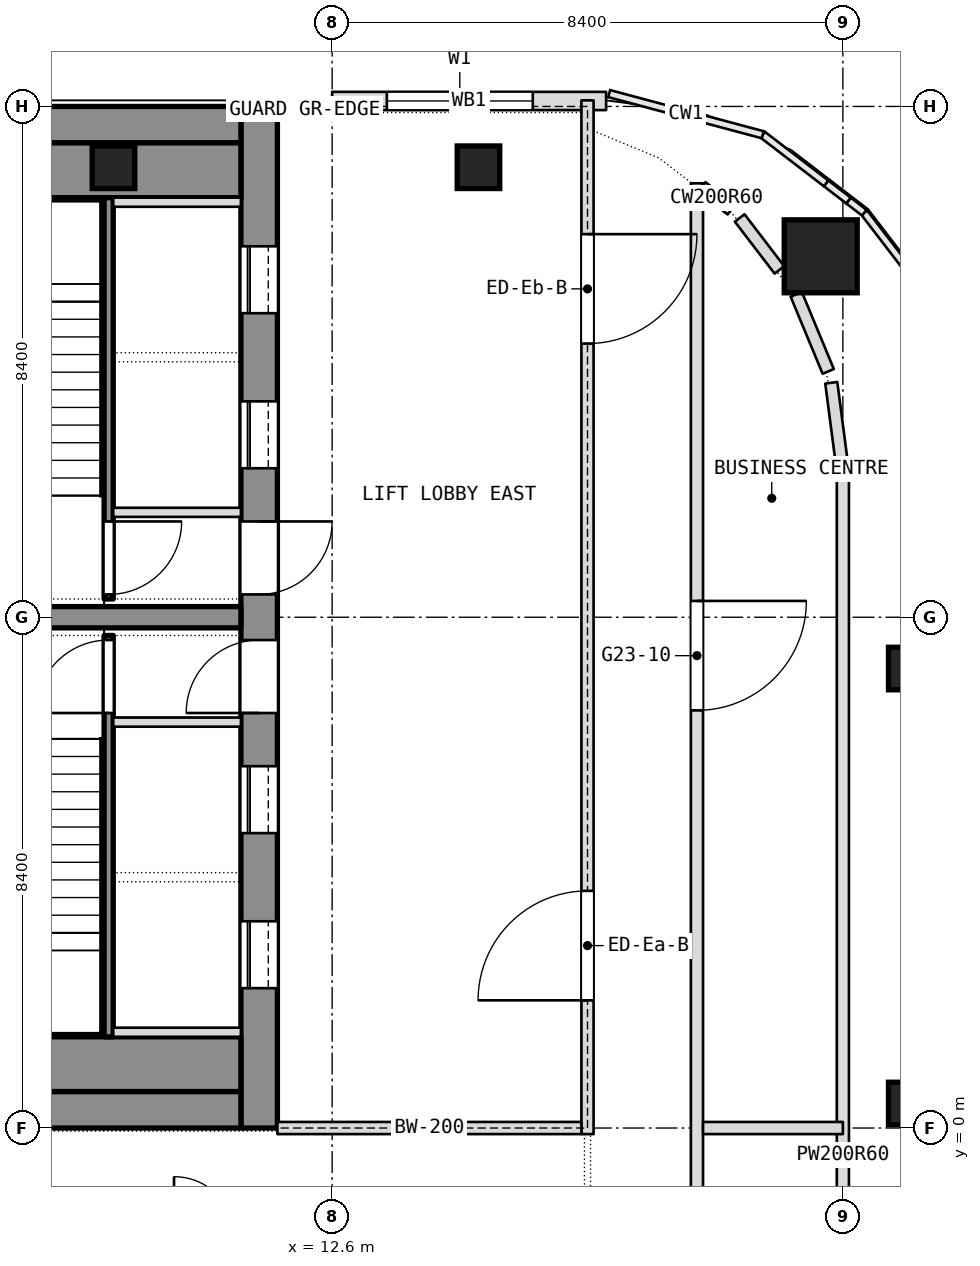
"""IFC4 building model, lengths in metres.
Left out: names, types, materials, properties, quantities, classifications, styles, units other than length and angle.
Written with IfcOpenShell. Run it as: python <this file> out.ifc"""

import sys

from ifc_helpers import new_model, si_unit, direction, frame, frame_2d, origin, origin_2d, place, context, subcontext, project, spatial, rectangle, extrude, element, fill, save


model = new_model("IFC4")
c1 = context("Model", 3, precision=1e-05, world=origin(), true_north=direction((0.0, 1.0)))
c2 = subcontext(c1, "Body", "Model", "MODEL_VIEW")
j1 = project(units=[si_unit("LENGTHUNIT", "METRE"), si_unit("PLANEANGLEUNIT", "RADIAN")], contexts=[c1])
p1 = place(None, origin())
s1 = spatial("IfcSite", under=j1, at=p1, CompositionType="ELEMENT")
p2 = place(p1, origin())
s2 = spatial("IfcBuilding", under=s1, at=p2, CompositionType="ELEMENT")
p3 = place(p2, frame((0.0, 0.0, 270.5)))
s3 = spatial("IfcBuildingStorey", under=s2, at=p3, CompositionType="ELEMENT", Elevation=270.5)
p4 = place(p3, frame((11.4, 0.0, 0.0), z_axis=(0.0, 0.0, 1.0), x_axis=(0.0, 1.0, 0.0)))
e1 = element("IfcWall", 1, at=p4, inside=s3, PredefinedType="SHEAR", context=c2, shape_type="SweptSolid", body=[
    extrude(rectangle(XDim=16.8, YDim=0.6, at=frame_2d((8.4, 0.0))), origin(), (0.0, 0.0, 1.0), 3.6),
])
p5 = place(p4, frame((2.3, 0.0, 0.0)))
e2 = element("IfcOpeningElement", 2, at=p5, cuts=e1, PredefinedType="OPENING", context=c2, shape_type="SweptSolid", body=[
    extrude(rectangle(XDim=1.1, YDim=2.1, at=frame_2d((0.55, 1.05))), frame((0.0, 0.3, 0.0), z_axis=(0.0, -1.0, 0.0), x_axis=(1.0, 0.0, 0.0)), (0.0, 0.0, 1.0), 0.6),
])
p6 = place(p4, frame((4.85, 0.0, 0.0)))
e3 = element("IfcOpeningElement", 3, at=p6, cuts=e1, PredefinedType="OPENING", context=c2, shape_type="SweptSolid", body=[
    extrude(rectangle(XDim=1.1, YDim=2.1, at=frame_2d((0.55, 1.05))), frame((0.0, 0.3, 0.0), z_axis=(0.0, -1.0, 0.0), x_axis=(1.0, 0.0, 0.0)), (0.0, 0.0, 1.0), 0.6),
])
p7 = place(p4, frame((6.825, 0.0, 0.0)))
e4 = element("IfcOpeningElement", 4, at=p7, cuts=e1, PredefinedType="OPENING", context=c2, shape_type="SweptSolid", body=[
    extrude(rectangle(XDim=1.2, YDim=2.1, at=frame_2d((0.6, 1.05))), frame((0.0, 0.3, 0.0), z_axis=(0.0, -1.0, 0.0), x_axis=(1.0, 0.0, 0.0)), (0.0, 0.0, 1.0), 0.6),
])
p8 = place(p4, frame((13.4, 0.0, 0.0)))
e5 = element("IfcOpeningElement", 5, at=p8, cuts=e1, PredefinedType="OPENING", context=c2, shape_type="SweptSolid", body=[
    extrude(rectangle(XDim=1.1, YDim=2.1, at=frame_2d((0.55, 1.05))), frame((0.0, 0.3, 0.0), z_axis=(0.0, -1.0, 0.0), x_axis=(1.0, 0.0, 0.0)), (0.0, 0.0, 1.0), 0.6),
])
p9 = place(p4, frame((10.85, 0.0, 0.0)))
e6 = element("IfcOpeningElement", 6, at=p9, cuts=e1, PredefinedType="OPENING", context=c2, shape_type="SweptSolid", body=[
    extrude(rectangle(XDim=1.1, YDim=2.1, at=frame_2d((0.55, 1.05))), frame((0.0, 0.3, 0.0), z_axis=(0.0, -1.0, 0.0), x_axis=(1.0, 0.0, 0.0)), (0.0, 0.0, 1.0), 0.6),
])
p10 = place(p4, frame((8.775, 0.0, 0.0)))
e7 = element("IfcOpeningElement", 7, at=p10, cuts=e1, PredefinedType="OPENING", context=c2, shape_type="SweptSolid", body=[
    extrude(rectangle(XDim=1.2, YDim=2.1, at=frame_2d((0.6, 1.05))), frame((0.0, 0.3, 0.0), z_axis=(0.0, -1.0, 0.0), x_axis=(1.0, 0.0, 0.0)), (0.0, 0.0, 1.0), 0.6),
])
for number, where, z_axis, x_axis in (
    (8, (-11.1, 0.3, 0.0), (0.0, 0.0, 1.0), (1.0, 0.0, 0.0)),
    (9, (-11.1, 16.5, 0.0), (0.0, 0.0, 1.0), (1.0, 0.0, 0.0)),
):
    element("IfcWall", number, at=place(p3, frame(where, z_axis=z_axis, x_axis=x_axis)), inside=s3, PredefinedType="SHEAR", context=c2, shape_type="SweptSolid", body=[
        extrude(rectangle(XDim=22.2, YDim=0.6, at=frame_2d((11.1, 0.0))), origin(), (0.0, 0.0, 1.0), 3.6),
    ])
p11 = place(p3, frame((4.375, 8.4, 0.0), z_axis=(0.0, 0.0, 1.0), x_axis=(1.0, 0.0, 0.0)))
e10 = element("IfcWall", 10, at=p11, inside=s3, PredefinedType="SHEAR", context=c2, shape_type="SweptSolid", body=[
    extrude(rectangle(XDim=6.725, YDim=0.35, at=frame_2d((3.363, 0.0))), origin(), (0.0, 0.0, 1.0), 3.6),
])
p12 = place(p3, frame((20.635, 14.335, 0.0), z_axis=(0.0, 0.0, 1.0), x_axis=(1.0, 0.0, 0.0)))
e11 = element("IfcColumn", 11, at=p12, inside=s3, PredefinedType="COLUMN", context=c2, shape_type="SweptSolid", body=[
    extrude(rectangle(XDim=1.2, YDim=1.2, at=origin_2d()), origin(), (0.0, 0.0, 1.0), 3.6),
])
for number, where, z_axis, x_axis in (
    (12, (9.004, 15.8, 0.0), (0.0, 0.0, 1.0), (1.0, 0.0, 0.0)),
    (13, (15.007, 15.8, 0.0), (0.0, 0.0, 1.0), (1.0, 0.0, 0.0)),
    (14, (22.1, 7.556, 0.0), (0.0, 0.0, 1.0), (1.0, 0.0, 0.0)),
    (15, (22.1, 0.403, 0.0), (0.0, 0.0, 1.0), (1.0, 0.0, 0.0)),
):
    element("IfcColumn", number, at=place(p3, frame(where, z_axis=z_axis, x_axis=x_axis)), inside=s3, PredefinedType="COLUMN", context=c2, shape_type="SweptSolid", body=[
        extrude(rectangle(XDim=0.7, YDim=0.7, at=origin_2d()), origin(), (0.0, 0.0, 1.0), 3.6),
    ])
p13 = place(p3, frame((21.0, -11.6, 0.0), z_axis=(0.0, 0.0, 1.0), x_axis=(0.0, 1.0, 0.0)))
e16 = element("IfcWall", 16, at=p13, inside=s3, PredefinedType="PARTITIONING", context=c2, shape_type="SweptSolid", body=[
    extrude(rectangle(XDim=22.302, YDim=0.2, at=frame_2d((11.151, 0.0))), origin(), (0.0, 0.0, 1.0), 3.34),
])
p14 = place(p3, frame((18.6, -11.8, 0.0), z_axis=(0.0, 0.0, 1.0), x_axis=(0.0, 1.0, 0.0)))
e17 = element("IfcWall", 17, at=p14, inside=s3, PredefinedType="PARTITIONING", context=c2, shape_type="SweptSolid", body=[
    extrude(rectangle(XDim=27.336, YDim=0.2, at=frame_2d((13.668, 0.0))), origin(), (0.0, 0.0, 1.0), 3.34),
])
p15 = place(p14, frame((18.668, 0.0, 0.0)))
e18 = element("IfcOpeningElement", 18, at=p15, cuts=e17, PredefinedType="OPENING", context=c2, shape_type="SweptSolid", body=[
    extrude(rectangle(XDim=1.8, YDim=2.1, at=frame_2d((0.9, 1.05))), frame((0.0, 0.1, 0.0), z_axis=(0.0, -1.0, 0.0), x_axis=(1.0, 0.0, 0.0)), (0.0, 0.0, 1.0), 0.2),
])
p16 = place(p14, frame((5.45, 0.0, 0.0)))
e19 = element("IfcOpeningElement", 19, at=p16, cuts=e17, PredefinedType="OPENING", context=c2, shape_type="SweptSolid", body=[
    extrude(rectangle(XDim=1.0, YDim=2.1, at=frame_2d((0.5, 1.05))), frame((0.0, 0.1, 0.0), z_axis=(0.0, -1.0, 0.0), x_axis=(1.0, 0.0, 0.0)), (0.0, 0.0, 1.0), 0.2),
])
p17 = place(p3, frame((18.7, 0.0, 0.0), z_axis=(0.0, 0.0, 1.0), x_axis=(1.0, 0.0, 0.0)))
e20 = element("IfcWall", 20, at=p17, inside=s3, PredefinedType="PARTITIONING", context=c2, shape_type="SweptSolid", body=[
    extrude(rectangle(XDim=2.3, YDim=0.2, at=frame_2d((1.15, 0.0))), origin(), (0.0, 0.0, 1.0), 3.0),
])
p18 = place(p3, frame((20.809, 12.256, 0.0), z_axis=(0.0, 0.0, 1.0), x_axis=(0.129841713905, -0.991534734303, 0.0)))
e21 = element("IfcWall", 21, at=p18, inside=s3, PredefinedType="PARTITIONING", context=c2, shape_type="SweptSolid", body=[
    extrude(rectangle(XDim=1.371, YDim=0.2, at=frame_2d((0.686, 0.0))), origin(), (0.0, 0.0, 1.0), 3.34),
])
p19 = place(p3, frame((18.679, 15.475, 0.0), z_axis=(0.0, 0.0, 1.0), x_axis=(0.794663000987, -0.607050833837, 0.0)))
e22 = element("IfcWall", 22, at=p19, inside=s3, PredefinedType="PARTITIONING", context=c2, shape_type="SweptSolid", body=[
    extrude(rectangle(XDim=0.613, YDim=0.2, at=frame_2d((0.306, 0.0))), origin(), (0.0, 0.0, 1.0), 3.34),
])
p20 = place(p3, frame((20.233, 13.71, 0.0), z_axis=(0.0, 0.0, 1.0), x_axis=(0.383540942064, -0.923523873953, 0.0)))
e23 = element("IfcWall", 23, at=p20, inside=s3, PredefinedType="PARTITIONING", context=c2, shape_type="SweptSolid", body=[
    extrude(rectangle(XDim=1.372, YDim=0.2, at=frame_2d((0.686, 0.0))), origin(), (0.0, 0.0, 1.0), 3.34),
])
p21 = place(p3, frame((19.303, 14.966, 0.0), z_axis=(0.0, 0.0, 1.0), x_axis=(0.607458536541, -0.794351387223, 0.0)))
e24 = element("IfcWall", 24, at=p21, inside=s3, PredefinedType="PARTITIONING", context=c2, shape_type="SweptSolid", body=[
    extrude(rectangle(XDim=1.075, YDim=0.2, at=frame_2d((0.538, 0.0))), origin(), (0.0, 0.0, 1.0), 3.34),
])
p22 = place(p3, frame((17.106, 16.89, 0.0), z_axis=(0.0, 0.0, 1.0), x_axis=(-1.0, 0.0, 0.0)))
e25 = element("IfcWall", 25, at=p22, inside=s3, PredefinedType="NOTDEFINED", context=c2, shape_type="SweptSolid", body=[
    extrude(rectangle(XDim=4.506, YDim=0.3, at=frame_2d((2.253, 0.0))), origin(), (0.0, 0.0, 1.0), 3.6),
])
p23 = place(p22, frame((1.206, 0.0, 0.9)))
e26 = element("IfcOpeningElement", 26, at=p23, cuts=e25, PredefinedType="OPENING", context=c2, shape_type="SweptSolid", body=[
    extrude(rectangle(XDim=2.4, YDim=2.1, at=frame_2d((1.2, 1.05))), frame((0.0, 0.15, 0.0), z_axis=(0.0, -1.0, 0.0), x_axis=(1.0, 0.0, 0.0)), (0.0, 0.0, 1.0), 0.3),
])
for number, where, z_axis, x_axis in (
    (27, (-11.1, 1.05, 0.0), (0.0, 0.0, 1.0), (1.0, 0.0, 0.0)),
    (28, (-11.1, 15.75, 0.0), (0.0, 0.0, 1.0), (1.0, 0.0, 0.0)),
):
    element("IfcWall", number, at=place(p3, frame(where, z_axis=z_axis, x_axis=x_axis)), inside=s3, PredefinedType="PARTITIONING", context=c2, shape_type="SweptSolid", body=[
        extrude(rectangle(XDim=22.2, YDim=0.9, at=frame_2d((11.1, 0.0))), origin(), (0.0, 0.0, 1.0), 3.34),
    ])
p24 = place(p3, frame((8.925, 1.5, 0.0), z_axis=(0.0, 0.0, 1.0), x_axis=(0.0, 1.0, 0.0)))
e29 = element("IfcWall", 29, at=p24, inside=s3, PredefinedType="SHEAR", context=c2, shape_type="SweptSolid", body=[
    extrude(rectangle(XDim=6.6, YDim=0.15, at=frame_2d((3.3, 0.0))), origin(), (0.0, 0.0, 1.0), 3.34),
])
p25 = place(p24, frame((5.325, 0.0, 0.0)))
e30 = element("IfcOpeningElement", 30, at=p25, cuts=e29, PredefinedType="OPENING", context=c2, shape_type="SweptSolid", body=[
    extrude(rectangle(XDim=1.2, YDim=2.1, at=frame_2d((0.6, 1.05))), frame((0.0, 0.075, 0.0), z_axis=(0.0, -1.0, 0.0), x_axis=(1.0, 0.0, 0.0)), (0.0, 0.0, 1.0), 0.15),
])
for number, where, z_axis, x_axis in (
    (31, (9.0, 6.675, 0.0), (0.0, 0.0, 1.0), (1.0, 0.0, 0.0)),
    (32, (9.0, 1.575, 0.0), (0.0, 0.0, 1.0), (1.0, 0.0, 0.0)),
):
    element("IfcWall", number, at=place(p3, frame(where, z_axis=z_axis, x_axis=x_axis)), inside=s3, PredefinedType="SHEAR", context=c2, shape_type="SweptSolid", body=[
        extrude(rectangle(XDim=2.1, YDim=0.15, at=frame_2d((1.05, 0.0))), origin(), (0.0, 0.0, 1.0), 3.6),
    ])
p26 = place(p3, frame((8.925, 8.7, 0.0), z_axis=(0.0, 0.0, 1.0), x_axis=(0.0, 1.0, 0.0)))
e33 = element("IfcWall", 33, at=p26, inside=s3, PredefinedType="SHEAR", context=c2, shape_type="SweptSolid", body=[
    extrude(rectangle(XDim=6.6, YDim=0.15, at=frame_2d((3.3, 0.0))), origin(), (0.0, 0.0, 1.0), 3.34),
])
p27 = place(p26, frame((0.075, 0.0, 0.0)))
e34 = element("IfcOpeningElement", 34, at=p27, cuts=e33, PredefinedType="OPENING", context=c2, shape_type="SweptSolid", body=[
    extrude(rectangle(XDim=1.2, YDim=2.1, at=frame_2d((0.6, 1.05))), frame((0.0, 0.075, 0.0), z_axis=(0.0, -1.0, 0.0), x_axis=(1.0, 0.0, 0.0)), (0.0, 0.0, 1.0), 0.15),
])
for number, where, z_axis, x_axis in (
    (35, (9.0, 10.125, 0.0), (0.0, 0.0, 1.0), (1.0, 0.0, 0.0)),
    (36, (9.0, 15.225, 0.0), (0.0, 0.0, 1.0), (1.0, 0.0, 0.0)),
):
    element("IfcWall", number, at=place(p3, frame(where, z_axis=z_axis, x_axis=x_axis)), inside=s3, PredefinedType="SHEAR", context=c2, shape_type="SweptSolid", body=[
        extrude(rectangle(XDim=2.1, YDim=0.15, at=frame_2d((1.05, 0.0))), origin(), (0.0, 0.0, 1.0), 3.6),
    ])
p28 = place(p3, frame((16.8, -0.1, 0.0), z_axis=(0.0, 0.0, 1.0), x_axis=(0.0, 1.0, 0.0)))
e37 = element("IfcWall", 37, at=p28, inside=s3, PredefinedType="PARTITIONING", context=c2, shape_type="SweptSolid", body=[
    extrude(rectangle(XDim=17.0, YDim=0.2, at=frame_2d((8.5, 0.0))), origin(), (0.0, 0.0, 1.0), 3.34),
])
p29 = place(p28, frame((2.2, 0.0, 0.0)))
e38 = element("IfcOpeningElement", 38, at=p29, cuts=e37, PredefinedType="OPENING", context=c2, shape_type="SweptSolid", body=[
    extrude(rectangle(XDim=1.8, YDim=2.1, at=frame_2d((0.9, 1.05))), frame((0.0, 0.1, 0.0), z_axis=(0.0, -1.0, 0.0), x_axis=(1.0, 0.0, 0.0)), (0.0, 0.0, 1.0), 0.2),
])
p30 = place(p28, frame((13.0, 0.0, 0.0)))
e39 = element("IfcOpeningElement", 39, at=p30, cuts=e37, PredefinedType="OPENING", context=c2, shape_type="SweptSolid", body=[
    extrude(rectangle(XDim=1.8, YDim=2.1, at=frame_2d((0.9, 1.05))), frame((0.0, 0.1, 0.0), z_axis=(0.0, -1.0, 0.0), x_axis=(1.0, 0.0, 0.0)), (0.0, 0.0, 1.0), 0.2),
])
p31 = place(p3, frame((11.7, 0.0, 0.0), z_axis=(0.0, 0.0, 1.0), x_axis=(1.0, 0.0, 0.0)))
e40 = element("IfcWall", 40, at=p31, inside=s3, PredefinedType="PARTITIONING", context=c2, shape_type="SweptSolid", body=[
    extrude(rectangle(XDim=5.0, YDim=0.2, at=frame_2d((2.5, 0.0))), origin(), (0.0, 0.0, 1.0), 3.0),
])
p32 = place(p15, origin())
e41 = element("IfcDoor", 41, at=p32, inside=s3, OperationType="DOUBLE_DOOR_SINGLE_SWING", PredefinedType="DOOR", context=c2, shape_type="SweptSolid", body=[
    extrude(rectangle(XDim=1.8, YDim=2.1, at=frame_2d((0.9, 1.05))), frame((0.0, 0.025, 0.0), z_axis=(0.0, -1.0, 0.0), x_axis=(1.0, 0.0, 0.0)), (0.0, 0.0, 1.0), 0.05),
])
fill(e18, e41)
p33 = place(p23, origin())
e42 = element("IfcWindow", 42, at=p33, inside=s3, PartitioningType="SINGLE_PANEL", PredefinedType="WINDOW", context=c2, shape_type="SweptSolid", body=[
    extrude(rectangle(XDim=2.4, YDim=2.1, at=frame_2d((1.2, 1.05))), frame((0.0, 0.03, 0.0), z_axis=(0.0, -1.0, 0.0), x_axis=(1.0, 0.0, 0.0)), (0.0, 0.0, 1.0), 0.06),
])
fill(e26, e42)
p34 = place(p5, origin())
e43 = element("IfcDoor", 43, at=p34, inside=s3, OperationType="SLIDING_TO_LEFT", PredefinedType="DOOR", context=c2, shape_type="SweptSolid", body=[
    extrude(rectangle(XDim=1.1, YDim=2.1, at=frame_2d((0.55, 1.05))), frame((0.0, 0.025, 0.0), z_axis=(0.0, -1.0, 0.0), x_axis=(1.0, 0.0, 0.0)), (0.0, 0.0, 1.0), 0.05),
])
fill(e2, e43)
p35 = place(p6, origin())
e44 = element("IfcDoor", 44, at=p35, inside=s3, OperationType="SLIDING_TO_LEFT", PredefinedType="DOOR", context=c2, shape_type="SweptSolid", body=[
    extrude(rectangle(XDim=1.1, YDim=2.1, at=frame_2d((0.55, 1.05))), frame((0.0, 0.025, 0.0), z_axis=(0.0, -1.0, 0.0), x_axis=(1.0, 0.0, 0.0)), (0.0, 0.0, 1.0), 0.05),
])
fill(e3, e44)
p36 = place(p7, origin())
e45 = element("IfcDoor", 45, at=p36, inside=s3, OperationType="SINGLE_SWING_LEFT", PredefinedType="DOOR", context=c2, shape_type="SweptSolid", body=[
    extrude(rectangle(XDim=1.2, YDim=2.1, at=frame_2d((0.6, 1.05))), frame((0.0, 0.025, 0.0), z_axis=(0.0, -1.0, 0.0), x_axis=(1.0, 0.0, 0.0)), (0.0, 0.0, 1.0), 0.05),
])
fill(e4, e45)
p37 = place(p25, origin())
e46 = element("IfcDoor", 46, at=p37, inside=s3, OperationType="SINGLE_SWING_LEFT", PredefinedType="DOOR", context=c2, shape_type="SweptSolid", body=[
    extrude(rectangle(XDim=1.2, YDim=2.1, at=frame_2d((0.6, 1.05))), frame((0.0, 0.025, 0.0), z_axis=(0.0, -1.0, 0.0), x_axis=(1.0, 0.0, 0.0)), (0.0, 0.0, 1.0), 0.05),
])
fill(e30, e46)
p38 = place(p8, origin())
e47 = element("IfcDoor", 47, at=p38, inside=s3, OperationType="SLIDING_TO_LEFT", PredefinedType="DOOR", context=c2, shape_type="SweptSolid", body=[
    extrude(rectangle(XDim=1.1, YDim=2.1, at=frame_2d((0.55, 1.05))), frame((0.0, 0.025, 0.0), z_axis=(0.0, -1.0, 0.0), x_axis=(1.0, 0.0, 0.0)), (0.0, 0.0, 1.0), 0.05),
])
fill(e5, e47)
p39 = place(p9, origin())
e48 = element("IfcDoor", 48, at=p39, inside=s3, OperationType="SLIDING_TO_LEFT", PredefinedType="DOOR", context=c2, shape_type="SweptSolid", body=[
    extrude(rectangle(XDim=1.1, YDim=2.1, at=frame_2d((0.55, 1.05))), frame((0.0, 0.025, 0.0), z_axis=(0.0, -1.0, 0.0), x_axis=(1.0, 0.0, 0.0)), (0.0, 0.0, 1.0), 0.05),
])
fill(e6, e48)
p40 = place(p10, origin())
e49 = element("IfcDoor", 49, at=p40, inside=s3, OperationType="SINGLE_SWING_LEFT", PredefinedType="DOOR", context=c2, shape_type="SweptSolid", body=[
    extrude(rectangle(XDim=1.2, YDim=2.1, at=frame_2d((0.6, 1.05))), frame((0.0, 0.025, 0.0), z_axis=(0.0, -1.0, 0.0), x_axis=(1.0, 0.0, 0.0)), (0.0, 0.0, 1.0), 0.05),
])
fill(e7, e49)
p41 = place(p27, origin())
e50 = element("IfcDoor", 50, at=p41, inside=s3, OperationType="SINGLE_SWING_LEFT", PredefinedType="DOOR", context=c2, shape_type="SweptSolid", body=[
    extrude(rectangle(XDim=1.2, YDim=2.1, at=frame_2d((0.6, 1.05))), frame((0.0, 0.025, 0.0), z_axis=(0.0, -1.0, 0.0), x_axis=(1.0, 0.0, 0.0)), (0.0, 0.0, 1.0), 0.05),
])
fill(e34, e50)
p42 = place(p29, origin())
e51 = element("IfcDoor", 51, at=p42, inside=s3, OperationType="DOUBLE_DOOR_SINGLE_SWING", PredefinedType="DOOR", context=c2, shape_type="SweptSolid", body=[
    extrude(rectangle(XDim=1.8, YDim=2.1, at=frame_2d((0.9, 1.05))), frame((0.0, 0.025, 0.0), z_axis=(0.0, -1.0, 0.0), x_axis=(1.0, 0.0, 0.0)), (0.0, 0.0, 1.0), 0.05),
])
fill(e38, e51)
p43 = place(p30, origin())
e52 = element("IfcDoor", 52, at=p43, inside=s3, OperationType="DOUBLE_DOOR_SINGLE_SWING", PredefinedType="DOOR", context=c2, shape_type="SweptSolid", body=[
    extrude(rectangle(XDim=1.8, YDim=2.1, at=frame_2d((0.9, 1.05))), frame((0.0, 0.025, 0.0), z_axis=(0.0, -1.0, 0.0), x_axis=(1.0, 0.0, 0.0)), (0.0, 0.0, 1.0), 0.05),
])
fill(e39, e52)
save(model, sys.argv[1])
